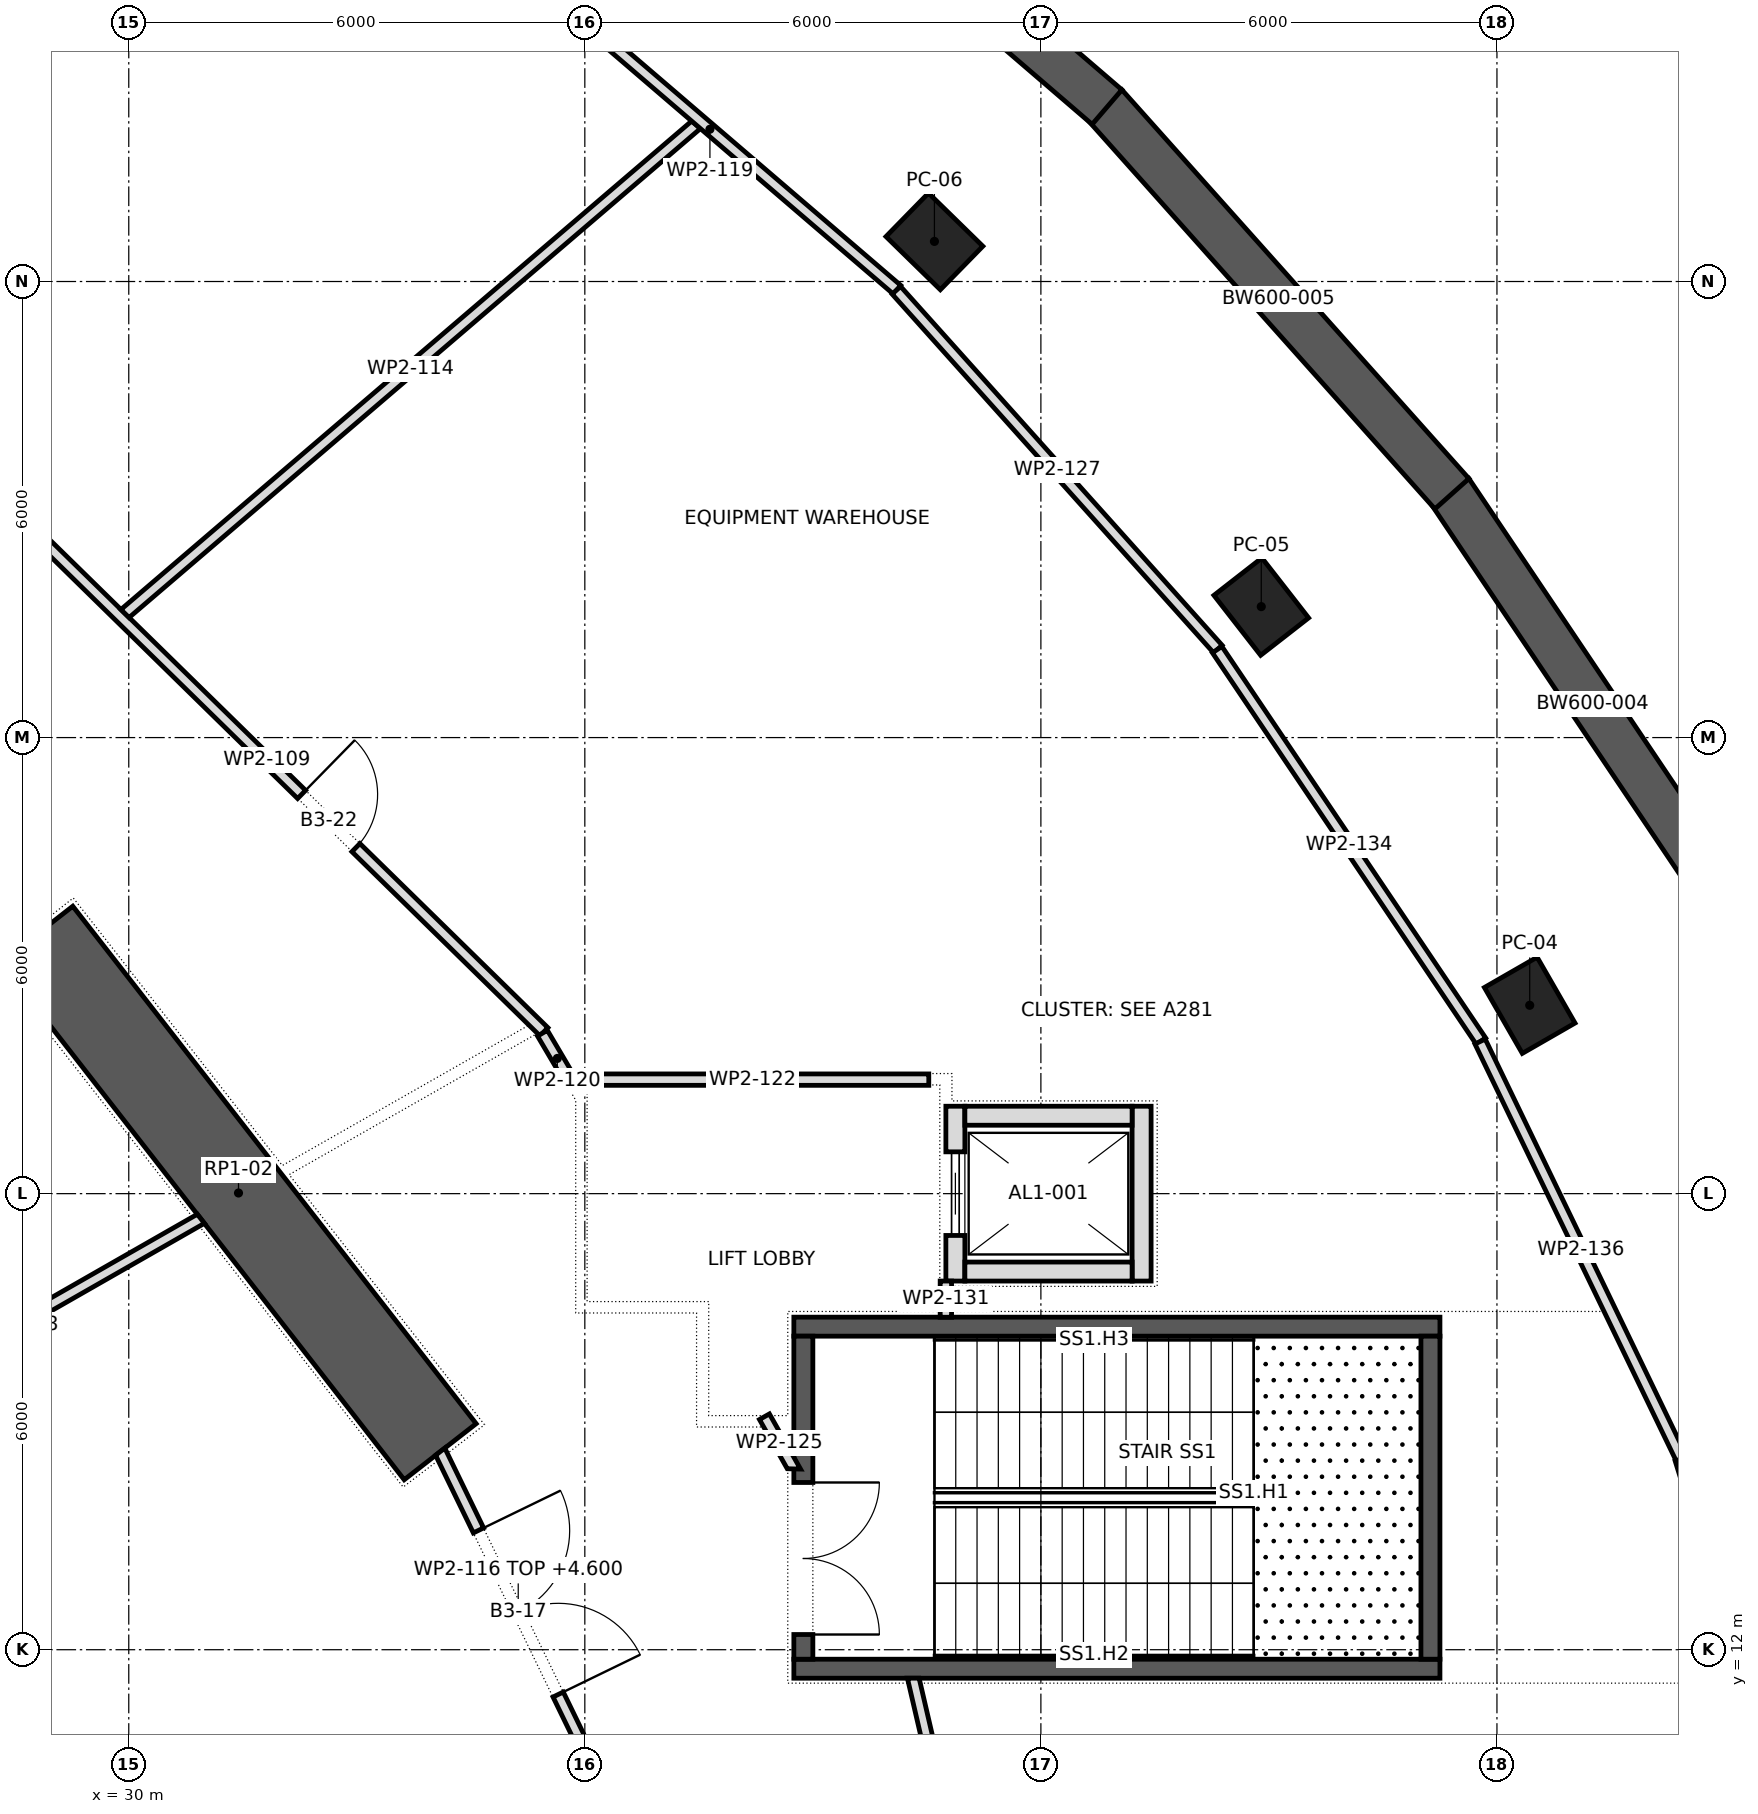
"""IFC4 building model, lengths in metres.
Left out: names, types, materials, properties, quantities, classifications, styles, units other than length and angle.
Written with IfcOpenShell. Run it as: python <this file> out.ifc"""

import sys

from ifc_helpers import new_model, si_unit, direction, frame, frame_2d, origin, origin_2d, place, context, subcontext, project, spatial, polyline, rectangle, outline, extrude, element, fill, save


model = new_model("IFC4")
c1 = context("Model", 3, precision=1e-05, world=origin(), true_north=direction((0.0, 1.0)))
c2 = subcontext(c1, "Body", "Model", "MODEL_VIEW")
j1 = project(units=[si_unit("LENGTHUNIT", "METRE"), si_unit("PLANEANGLEUNIT", "RADIAN")], contexts=[c1])
p1 = place(None, origin())
s1 = spatial("IfcSite", under=j1, at=p1, CompositionType="ELEMENT")
p2 = place(p1, origin())
s2 = spatial("IfcBuilding", under=s1, at=p2, CompositionType="ELEMENT")
p3 = place(p2, frame((0.0, 0.0, -15.0)))
s3 = spatial("IfcBuildingStorey", under=s2, at=p3, CompositionType="ELEMENT", Elevation=-15.0)
for number, where, z_axis, x_axis in (
    (1, (48.431, 20.478, -0.4), (0.0, 0.0, 1.0), (-0.499, 0.867, 0.0)),
    (2, (44.899, 25.723, -0.4), (0.0, 0.0, 1.0), (-0.615, 0.789, 0.0)),
    (3, (40.599, 30.528, -0.4), (0.0, 0.0, 1.0), (-0.715, 0.699, 0.0)),
):
    element("IfcColumn", number, at=place(p3, frame(where, z_axis=z_axis, x_axis=x_axis)), inside=s3, PredefinedType="COLUMN", context=c2, shape_type="SweptSolid", body=[
        extrude(rectangle(XDim=1.0, YDim=0.8, at=origin_2d()), origin(), (0.0, 0.0, 1.0), 5.9),
    ])
p4 = place(p3, frame((34.097, 14.605, -0.4), z_axis=(0.0, 0.0, 1.0), x_axis=(-0.614825322247, 0.788663314174, 0.0)))
e4 = element("IfcWall", 4, at=p4, inside=s3, PredefinedType="SHEAR", context=c2, shape_type="SweptSolid", body=[
    extrude(rectangle(XDim=8.632, YDim=1.2, at=frame_2d((4.316, 0.0))), origin(), (0.0, 0.0, 1.0), 5.9),
])
p5 = place(p3, frame((51.134, 21.654, -0.4), z_axis=(0.0, 0.0, 1.0), x_axis=(-0.557518861869, 0.830164272093, 0.0)))
e5 = element("IfcWall", 5, at=p5, inside=s3, PredefinedType="SOLIDWALL", context=c2, shape_type="SweptSolid", body=[
    extrude(rectangle(XDim=6.729, YDim=0.6, at=frame_2d((3.364, 0.0))), origin(), (0.0, 0.0, 1.0), 5.9),
])
p6 = place(p3, frame((47.407, 27.208, -0.4), z_axis=(0.0, 0.0, 1.0), x_axis=(-0.665894053378, 0.74604631872, 0.0)))
e6 = element("IfcWall", 6, at=p6, inside=s3, PredefinedType="SOLIDWALL", context=c2, shape_type="SweptSolid", body=[
    extrude(rectangle(XDim=6.856, YDim=0.6, at=frame_2d((3.428, 0.0))), origin(), (0.0, 0.0, 1.0), 5.9),
])
p7 = place(p3, frame((42.87, 32.295, -0.4), z_axis=(0.0, 0.0, 1.0), x_axis=(-0.758319142722, 0.65188348482, 0.0)))
e7 = element("IfcWall", 7, at=p7, inside=s3, PredefinedType="SOLIDWALL", context=c2, shape_type="SweptSolid", body=[
    extrude(rectangle(XDim=6.991, YDim=0.6, at=frame_2d((3.496, 0.0))), origin(), (0.0, 0.0, 1.0), 5.9),
])
for number, where, z_axis, x_axis in (
    (8, (38.75, 16.25, 0.0), (0.0, 0.0, 1.0), (1.0, 0.0, 0.0)),
    (9, (38.75, 11.75, 0.0), (0.0, 0.0, 1.0), (1.0, 0.0, 0.0)),
):
    element("IfcWall", number, at=place(p3, frame(where, z_axis=z_axis, x_axis=x_axis)), inside=s3, PredefinedType="SHEAR", context=c2, shape_type="SweptSolid", body=[
        extrude(rectangle(XDim=8.5, YDim=0.25, at=frame_2d((4.25, 0.0))), origin(), (0.0, 0.0, 1.0), 5.15),
    ])
p8 = place(p3, frame((38.875, 11.875, 0.0), z_axis=(0.0, 0.0, 1.0), x_axis=(0.0, 1.0, 0.0)))
e10 = element("IfcWall", 10, at=p8, inside=s3, PredefinedType="SHEAR", context=c2, shape_type="SweptSolid", body=[
    extrude(rectangle(XDim=4.25, YDim=0.25, at=frame_2d((2.125, 0.0))), origin(), (0.0, 0.0, 1.0), 5.15),
])
p9 = place(p8, frame((0.325, 0.0, 0.0)))
e11 = element("IfcOpeningElement", 11, at=p9, cuts=e10, PredefinedType="OPENING", context=c2, shape_type="SweptSolid", body=[
    extrude(rectangle(XDim=2.0, YDim=2.1, at=frame_2d((1.0, 1.05))), frame((0.0, 0.137, 0.0), z_axis=(0.0, -1.0, 0.0), x_axis=(1.0, 0.0, 0.0)), (0.0, 0.0, 1.0), 0.274),
])
p10 = place(p3, frame((47.125, 11.875, 0.0), z_axis=(0.0, 0.0, 1.0), x_axis=(0.0, 1.0, 0.0)))
e12 = element("IfcWall", 12, at=p10, inside=s3, PredefinedType="SHEAR", context=c2, shape_type="SweptSolid", body=[
    extrude(rectangle(XDim=4.25, YDim=0.25, at=frame_2d((2.125, 0.0))), origin(), (0.0, 0.0, 1.0), 5.15),
])
p11 = place(p3, frame((40.875, 16.85, 0.0), z_axis=(0.0, 0.0, 1.0), x_axis=(0.0, 1.0, 0.0)))
e13 = element("IfcWall", 13, at=p11, inside=s3, PredefinedType="PARTITIONING", context=c2, shape_type="SweptSolid", body=[
    extrude(rectangle(XDim=2.3, YDim=0.25, at=frame_2d((1.15, 0.0))), origin(), (0.0, 0.0, 1.0), 5.15),
])
p12 = place(p11, frame((0.6, 0.0, 0.0)))
e14 = element("IfcOpeningElement", 14, at=p12, cuts=e13, PredefinedType="OPENING", context=c2, shape_type="SweptSolid", body=[
    extrude(rectangle(XDim=1.1, YDim=2.1, at=frame_2d((0.55, 1.05))), frame((0.0, 0.137, 0.0), z_axis=(0.0, -1.0, 0.0), x_axis=(1.0, 0.0, 0.0)), (0.0, 0.0, 1.0), 0.274),
])
p13 = place(p3, frame((43.325, 16.85, 0.0), z_axis=(0.0, 0.0, 1.0), x_axis=(0.0, 1.0, 0.0)))
e15 = element("IfcWall", 15, at=p13, inside=s3, PredefinedType="PARTITIONING", context=c2, shape_type="SweptSolid", body=[
    extrude(rectangle(XDim=2.3, YDim=0.25, at=frame_2d((1.15, 0.0))), origin(), (0.0, 0.0, 1.0), 5.15),
])
for number, where, z_axis, x_axis in (
    (16, (41.0, 19.025, 0.0), (0.0, 0.0, 1.0), (1.0, 0.0, 0.0)),
    (17, (41.0, 16.975, 0.0), (0.0, 0.0, 1.0), (1.0, 0.0, 0.0)),
):
    element("IfcWall", number, at=place(p3, frame(where, z_axis=z_axis, x_axis=x_axis)), inside=s3, PredefinedType="PARTITIONING", context=c2, shape_type="SweptSolid", body=[
        extrude(rectangle(XDim=2.2, YDim=0.25, at=frame_2d((1.1, 0.0))), origin(), (0.0, 0.0, 1.0), 5.15),
    ])
p14 = place(p3, frame((26.074, 14.882, 0.0), z_axis=(0.0, 0.0, 1.0), x_axis=(0.868133416031, 0.496330909746, 0.0)))
e18 = element("IfcWall", 18, at=p14, inside=s3, PredefinedType="PARTITIONING", context=c2, shape_type="SweptSolid", body=[
    extrude(outline(polyline([(0.0, -0.075), (5.626, -0.075), (5.604, 0.075), (0.0, 0.075), (0.0, -0.075)])), origin(), (0.0, 0.0, 1.0), 5.15),
])
p15 = place(p3, frame((28.174, 27.268, 0.0), z_axis=(0.0, 0.0, 1.0), x_axis=(0.714427427428, -0.699709547554, 0.0)))
e19 = element("IfcWall", 19, at=p15, inside=s3, PredefinedType="PARTITIONING", context=c2, shape_type="SweptSolid", body=[
    extrude(rectangle(XDim=10.202, YDim=0.15, at=frame_2d((5.101, 0.0))), origin(), (0.0, 0.0, 1.0), 5.15),
])
p16 = place(p15, frame((5.74, 0.0, 0.0)))
e20 = element("IfcOpeningElement", 20, at=p16, cuts=e19, PredefinedType="OPENING", context=c2, shape_type="SweptSolid", body=[
    extrude(rectangle(XDim=1.0, YDim=2.1, at=frame_2d((0.5, 1.05))), frame((0.0, 0.087, 0.0), z_axis=(0.0, -1.0, 0.0), x_axis=(1.0, 0.0, 0.0)), (0.0, 0.0, 1.0), 0.174),
])
p17 = place(p3, frame((29.95, 25.632, 0.0), z_axis=(0.0, 0.0, 1.0), x_axis=(0.759739094859, 0.650228042876, 0.0)))
e21 = element("IfcWall", 21, at=p17, inside=s3, PredefinedType="PARTITIONING", context=c2, shape_type="SweptSolid", body=[
    extrude(outline(polyline([(0.007, -0.075), (9.901, -0.075), (9.878, 0.075), (-0.007, 0.075), (0.007, -0.075)])), origin(), (0.0, 0.0, 1.0), 5.15),
])
p18 = place(p3, frame((34.097, 14.606, 0.0), z_axis=(0.0, 0.0, 1.0), x_axis=(0.436936398764, -0.899492403212, 0.0)))
e22 = element("IfcWall", 22, at=p18, inside=s3, PredefinedType="PARTITIONING", context=c2, shape_type="SweptSolid", body=[
    extrude(outline(polyline([(0.016, -0.075), (4.681, -0.075), (4.715, 0.075), (-0.016, 0.075), (0.016, -0.075)])), origin(), (0.0, 0.0, 1.0), 4.6),
])
p19 = place(p18, frame((1.152, 0.0, 0.0)))
e23 = element("IfcOpeningElement", 23, at=p19, cuts=e22, PredefinedType="OPENING", context=c2, shape_type="SweptSolid", body=[
    extrude(rectangle(XDim=2.4, YDim=2.1, at=frame_2d((1.2, 1.05))), frame((0.0, 0.087, 0.0), z_axis=(0.0, -1.0, 0.0), x_axis=(1.0, 0.0, 0.0)), (0.0, 0.0, 1.0), 0.174),
])
p20 = place(p3, frame((35.185, 34.114, 0.0), z_axis=(0.0, 0.0, 1.0), x_axis=(0.759033312601, -0.651051787773, 0.0)))
e24 = element("IfcWall", 24, at=p20, inside=s3, PredefinedType="PARTITIONING", context=c2, shape_type="SweptSolid", body=[
    extrude(rectangle(XDim=6.484, YDim=0.15, at=frame_2d((3.242, 0.0))), origin(), (0.0, 0.0, 1.0), 5.15),
])
p21 = place(p3, frame((35.443, 20.111, 0.0), z_axis=(0.0, 0.0, 1.0), x_axis=(0.507767925719, -0.861493896444, 0.0)))
e25 = element("IfcWall", 25, at=p21, inside=s3, PredefinedType="PARTITIONING", context=c2, shape_type="SweptSolid", body=[
    extrude(rectangle(XDim=0.77, YDim=0.15, at=frame_2d((0.385, 0.0))), origin(), (0.0, 0.0, 1.0), 5.15),
])
p22 = place(p3, frame((35.889, 19.5, 0.0), z_axis=(0.0, 0.0, 1.0), x_axis=(1.0, 0.0, 0.0)))
e26 = element("IfcWall", 26, at=p22, inside=s3, PredefinedType="PARTITIONING", context=c2, shape_type="SweptSolid", body=[
    extrude(outline(polyline([(0.045, -0.075), (4.636, -0.075), (4.636, 0.075), (-0.045, 0.075), (0.045, -0.075)])), origin(), (0.0, 0.0, 1.0), 5.15),
])
p23 = place(p3, frame((38.363, 15.065, 0.0), z_axis=(0.0, 0.0, 1.0), x_axis=(0.49173071, -0.870747327784, 0.0)))
e27 = element("IfcWall", 27, at=p23, inside=s3, PredefinedType="PARTITIONING", context=c2, shape_type="SweptSolid", body=[
    extrude(outline(polyline([(0.0, -0.075), (0.743, -0.075), (0.833, 0.075), (0.0, 0.075), (0.0, -0.075)])), origin(), (0.0, 0.0, 1.0), 5.15),
])
p24 = place(p3, frame((40.099, 29.885, 0.0), z_axis=(0.0, 0.0, 1.0), x_axis=(0.6673947824, -0.744704105283, 0.0)))
e28 = element("IfcWall", 28, at=p24, inside=s3, PredefinedType="PARTITIONING", context=c2, shape_type="SweptSolid", body=[
    extrude(rectangle(XDim=6.338, YDim=0.15, at=frame_2d((3.169, 0.0))), origin(), (0.0, 0.0, 1.0), 5.15),
])
p25 = place(p3, frame((40.321, 11.625, 0.0), z_axis=(0.0, 0.0, 1.0), x_axis=(0.226176729561, -0.974086283142, 0.0)))
e29 = element("IfcWall", 29, at=p25, inside=s3, PredefinedType="PARTITIONING", context=c2, shape_type="SweptSolid", body=[
    extrude(outline(polyline([(-0.017, -0.075), (9.501, -0.075), (9.501, 0.075), (0.017, 0.075), (-0.017, -0.075)])), origin(), (0.0, 0.0, 1.0), 5.15),
])
p26 = place(p25, frame((4.249, 0.0, 0.0)))
e30 = element("IfcOpeningElement", 30, at=p26, cuts=e29, PredefinedType="OPENING", context=c2, shape_type="SweptSolid", body=[
    extrude(rectangle(XDim=1.0, YDim=2.1, at=frame_2d((0.5, 1.05))), frame((0.0, 0.087, 0.0), z_axis=(0.0, -1.0, 0.0), x_axis=(1.0, 0.0, 0.0)), (0.0, 0.0, 1.0), 0.174),
])
p27 = place(p3, frame((40.75, 16.85, 0.0), z_axis=(0.0, 0.0, 1.0), x_axis=(0.0, -1.0, 0.0)))
e31 = element("IfcWall", 31, at=p27, inside=s3, PredefinedType="PARTITIONING", context=c2, shape_type="SweptSolid", body=[
    extrude(rectangle(XDim=0.476, YDim=0.15, at=frame_2d((0.238, 0.0))), origin(), (0.0, 0.0, 1.0), 5.15),
])
p28 = place(p3, frame((44.319, 25.157, 0.0), z_axis=(0.0, 0.0, 1.0), x_axis=(0.558812320082, -0.829294152231, 0.0)))
e32 = element("IfcWall", 32, at=p28, inside=s3, PredefinedType="PARTITIONING", context=c2, shape_type="SweptSolid", body=[
    extrude(rectangle(XDim=6.21, YDim=0.15, at=frame_2d((3.105, 0.0))), origin(), (0.0, 0.0, 1.0), 5.15),
])
p29 = place(p3, frame((47.778, 20.001, 0.0), z_axis=(0.0, 0.0, 1.0), x_axis=(0.434690826011, -0.900579749818, 0.0)))
e33 = element("IfcWall", 33, at=p29, inside=s3, PredefinedType="PARTITIONING", context=c2, shape_type="SweptSolid", body=[
    extrude(rectangle(XDim=6.096, YDim=0.15, at=frame_2d((3.048, 0.0))), origin(), (0.0, 0.0, 1.0), 5.15),
])
p30 = place(p3, frame((50.416, 14.506, 0.0), z_axis=(0.0, 0.0, 1.0), x_axis=(0.297713123711, -0.954655380737, 0.0)))
e34 = element("IfcWall", 34, at=p30, inside=s3, PredefinedType="PARTITIONING", context=c2, shape_type="SweptSolid", body=[
    extrude(rectangle(XDim=6.013, YDim=0.15, at=frame_2d((3.006, 0.0))), origin(), (0.0, 0.0, 1.0), 5.15),
])
p31 = place(p12, origin())
e35 = element("IfcDoor", 35, at=p31, inside=s3, OperationType="SLIDING_TO_LEFT", PredefinedType="DOOR", context=c2, shape_type="SweptSolid", body=[
    extrude(rectangle(XDim=1.1, YDim=2.1, at=frame_2d((0.55, 1.05))), frame((0.0, 0.025, 0.0), z_axis=(0.0, -1.0, 0.0), x_axis=(1.0, 0.0, 0.0)), (0.0, 0.0, 1.0), 0.05),
])
fill(e14, e35)
p32 = place(p9, frame((2.0, 0.0, 0.0), z_axis=(0.0, 0.0, 1.0), x_axis=(-1.0, 0.0, 0.0)))
e36 = element("IfcDoor", 36, at=p32, inside=s3, OperationType="DOUBLE_DOOR_SINGLE_SWING", PredefinedType="DOOR", context=c2, shape_type="SweptSolid", body=[
    extrude(rectangle(XDim=2.0, YDim=2.1, at=frame_2d((1.0, 1.05))), frame((0.0, 0.025, 0.0), z_axis=(0.0, -1.0, 0.0), x_axis=(1.0, 0.0, 0.0)), (0.0, 0.0, 1.0), 0.05),
])
fill(e11, e36)
p33 = place(p19, origin())
e37 = element("IfcDoor", 37, at=p33, inside=s3, OperationType="DOUBLE_DOOR_SINGLE_SWING", PredefinedType="DOOR", context=c2, shape_type="SweptSolid", body=[
    extrude(rectangle(XDim=2.4, YDim=2.1, at=frame_2d((1.2, 1.05))), frame((0.0, 0.025, 0.0), z_axis=(0.0, -1.0, 0.0), x_axis=(1.0, 0.0, 0.0)), (0.0, 0.0, 1.0), 0.05),
])
fill(e23, e37)
p34 = place(p16, origin())
e38 = element("IfcDoor", 38, at=p34, inside=s3, OperationType="SINGLE_SWING_RIGHT", PredefinedType="DOOR", context=c2, shape_type="SweptSolid", body=[
    extrude(rectangle(XDim=1.0, YDim=2.1, at=frame_2d((0.5, 1.05))), frame((0.0, 0.025, 0.0), z_axis=(0.0, -1.0, 0.0), x_axis=(1.0, 0.0, 0.0)), (0.0, 0.0, 1.0), 0.05),
])
fill(e20, e38)
save(model, sys.argv[1])
